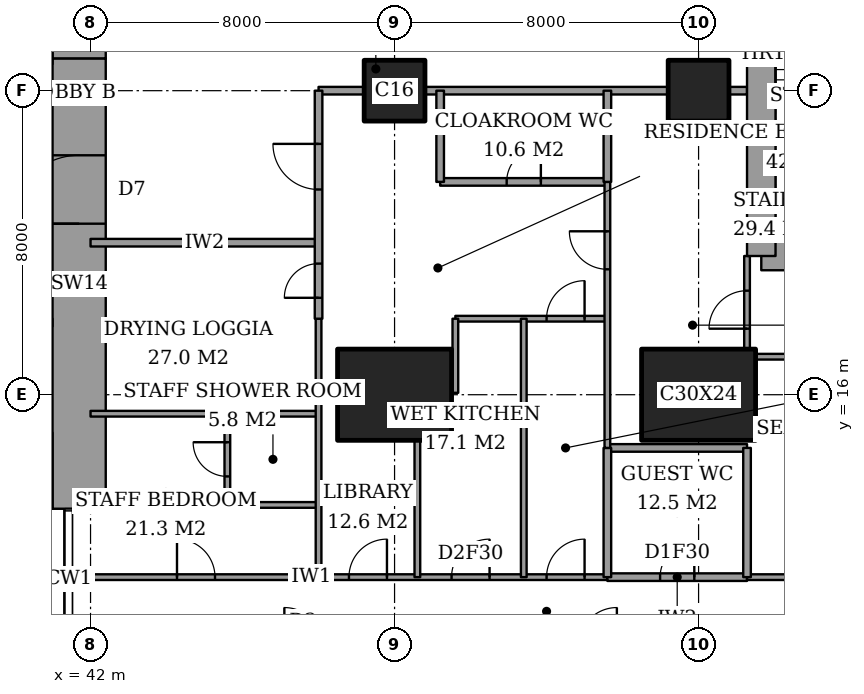
"""IFC4 building model, lengths in metres.
Left out: names, types, materials, properties, quantities, classifications, styles, units other than length and angle.
Written with IfcOpenShell. Run it as: python <this file> out.ifc"""

import sys

from ifc_helpers import new_model, si_unit, direction, frame, frame_2d, origin, origin_2d, place, context, subcontext, project, spatial, rectangle, extrude, element, fill, save


model = new_model("IFC4")
c1 = context("Model", 3, precision=1e-05, world=origin(), true_north=direction((0.0, 1.0)))
c2 = subcontext(c1, "Body", "Model", "MODEL_VIEW")
j1 = project(units=[si_unit("LENGTHUNIT", "METRE"), si_unit("PLANEANGLEUNIT", "RADIAN")], contexts=[c1])
p1 = place(None, origin())
s1 = spatial("IfcSite", under=j1, at=p1, CompositionType="ELEMENT")
p2 = place(p1, origin())
s2 = spatial("IfcBuilding", under=s1, at=p2, CompositionType="ELEMENT")
p3 = place(p2, frame((0.0, 0.0, 255.6)))
s3 = spatial("IfcBuildingStorey", under=s2, at=p3, CompositionType="ELEMENT", Elevation=255.6)
p4 = place(p3, frame((50.0, 16.0, 0.0), z_axis=(0.0, 0.0, 1.0), x_axis=(1.0, 0.0, 0.0)))
e1 = element("IfcColumn", 1, at=p4, inside=s3, PredefinedType="COLUMN", context=c2, shape_type="SweptSolid", body=[
    extrude(rectangle(XDim=3.0, YDim=2.4, at=origin_2d()), origin(), (0.0, 0.0, 1.0), 3.6),
])
p5 = place(p3, frame((50.0, 24.0, 0.0), z_axis=(0.0, 0.0, 1.0), x_axis=(1.0, 0.0, 0.0)))
e2 = element("IfcColumn", 2, at=p5, inside=s3, PredefinedType="COLUMN", context=c2, shape_type="SweptSolid", body=[
    extrude(rectangle(XDim=1.6, YDim=1.6, at=origin_2d()), origin(), (0.0, 0.0, 1.0), 3.6),
])
p6 = place(p3, frame((58.0, 16.0, 0.0), z_axis=(0.0, 0.0, 1.0), x_axis=(1.0, 0.0, 0.0)))
e3 = element("IfcColumn", 3, at=p6, inside=s3, PredefinedType="COLUMN", context=c2, shape_type="SweptSolid", body=[
    extrude(rectangle(XDim=3.0, YDim=2.4, at=origin_2d()), origin(), (0.0, 0.0, 1.0), 3.6),
])
p7 = place(p3, frame((58.0, 24.0, 0.0), z_axis=(0.0, 0.0, 1.0), x_axis=(1.0, 0.0, 0.0)))
e4 = element("IfcColumn", 4, at=p7, inside=s3, PredefinedType="COLUMN", context=c2, shape_type="SweptSolid", body=[
    extrude(rectangle(XDim=1.6, YDim=1.6, at=origin_2d()), origin(), (0.0, 0.0, 1.0), 3.6),
])
p8 = place(p3, frame((41.7, 13.0, 0.0), z_axis=(0.0, 0.0, 1.0), x_axis=(0.0, 1.0, 0.0)))
e5 = element("IfcWall", 5, at=p8, inside=s3, PredefinedType="SHEAR", context=c2, shape_type="SweptSolid", body=[
    extrude(rectangle(XDim=11.85, YDim=1.4, at=frame_2d((5.925, 0.0))), origin(), (0.0, 0.0, 1.0), 3.6),
])
p9 = place(p8, frame((7.5, 0.0, 0.0)))
e6 = element("IfcOpeningElement", 6, at=p9, cuts=e5, PredefinedType="OPENING", context=c2, shape_type="SweptSolid", body=[
    extrude(rectangle(XDim=1.8, YDim=2.4, at=frame_2d((0.9, 1.2))), frame((0.0, 0.71, 0.0), z_axis=(0.0, -1.0, 0.0), x_axis=(1.0, 0.0, 0.0)), (0.0, 0.0, 1.0), 1.42),
])
p10 = place(p3, frame((41.7, 24.85, 0.0), z_axis=(0.0, 0.0, 1.0), x_axis=(0.0, 1.0, 0.0)))
e7 = element("IfcWall", 7, at=p10, inside=s3, PredefinedType="SHEAR", context=c2, shape_type="SweptSolid", body=[
    extrude(rectangle(XDim=10.15, YDim=1.4, at=frame_2d((5.075, 0.0))), origin(), (0.0, 0.0, 1.0), 3.6),
])
p11 = place(p3, frame((59.65, 19.65, 0.0), z_axis=(0.0, 0.0, 1.0), x_axis=(1.0, 0.0, 0.0)))
e8 = element("IfcWall", 8, at=p11, inside=s3, PredefinedType="SHEAR", context=c2, shape_type="SweptSolid", body=[
    extrude(rectangle(XDim=4.45, YDim=0.75, at=frame_2d((2.225, 0.0))), origin(), (0.0, 0.0, 1.0), 3.6),
])
p12 = place(p3, frame((59.65, 28.35, 0.0), z_axis=(0.0, 0.0, 1.0), x_axis=(0.0, -1.0, 0.0)))
e9 = element("IfcWall", 9, at=p12, inside=s3, PredefinedType="SHEAR", context=c2, shape_type="SweptSolid", body=[
    extrude(rectangle(XDim=8.7, YDim=0.75, at=frame_2d((4.35, 0.0))), origin(), (0.0, 0.0, 1.0), 3.6),
])
p13 = place(p12, frame((0.975, 0.0, 0.0)))
e10 = element("IfcOpeningElement", 10, at=p13, cuts=e9, PredefinedType="OPENING", context=c2, shape_type="SweptSolid", body=[
    extrude(rectangle(XDim=1.0, YDim=2.1, at=frame_2d((0.5, 1.05))), frame((0.0, 0.385, 0.0), z_axis=(0.0, -1.0, 0.0), x_axis=(1.0, 0.0, 0.0)), (0.0, 0.0, 1.0), 0.77),
])
p14 = place(p3, frame((55.6, 11.2, 0.0), z_axis=(0.0, 0.0, 1.0), x_axis=(1.0, 0.0, 0.0)))
e11 = element("IfcWall", 11, at=p14, inside=s3, PredefinedType="PARTITIONING", context=c2, shape_type="SweptSolid", body=[
    extrude(rectangle(XDim=3.675, YDim=0.2, at=frame_2d((1.837, 0.0))), origin(), (0.0, 0.0, 1.0), 3.35),
])
p15 = place(p14, frame((1.387, 0.0, 0.0)))
e12 = element("IfcOpeningElement", 12, at=p15, cuts=e11, PredefinedType="OPENING", context=c2, shape_type="SweptSolid", body=[
    extrude(rectangle(XDim=0.9, YDim=2.1, at=frame_2d((0.45, 1.05))), frame((0.0, 0.11, 0.0), z_axis=(0.0, -1.0, 0.0), x_axis=(1.0, 0.0, 0.0)), (0.0, 0.0, 1.0), 0.22),
])
p16 = place(p3, frame((41.439, 11.2, 0.0), z_axis=(0.0, 0.0, 1.0), x_axis=(1.0, 0.0, 0.0)))
e13 = element("IfcWall", 13, at=p16, inside=s3, PredefinedType="PARTITIONING", context=c2, shape_type="SweptSolid", body=[
    extrude(rectangle(XDim=14.161, YDim=0.15, at=frame_2d((7.081, 0.0))), origin(), (0.0, 0.0, 1.0), 3.35),
])
p17 = place(p16, frame((12.561, 0.0, 0.0)))
e14 = element("IfcOpeningElement", 14, at=p17, cuts=e13, PredefinedType="OPENING", context=c2, shape_type="SweptSolid", body=[
    extrude(rectangle(XDim=1.0, YDim=2.1, at=frame_2d((0.5, 1.05))), frame((0.0, 0.085, 0.0), z_axis=(0.0, -1.0, 0.0), x_axis=(1.0, 0.0, 0.0)), (0.0, 0.0, 1.0), 0.17),
])
p18 = place(p16, frame((10.061, 0.0, 0.0)))
e15 = element("IfcOpeningElement", 15, at=p18, cuts=e13, PredefinedType="OPENING", context=c2, shape_type="SweptSolid", body=[
    extrude(rectangle(XDim=1.0, YDim=2.1, at=frame_2d((0.5, 1.05))), frame((0.0, 0.085, 0.0), z_axis=(0.0, -1.0, 0.0), x_axis=(1.0, 0.0, 0.0)), (0.0, 0.0, 1.0), 0.17),
])
p19 = place(p16, frame((7.361, 0.0, 0.0)))
e16 = element("IfcOpeningElement", 16, at=p19, cuts=e13, PredefinedType="OPENING", context=c2, shape_type="SweptSolid", body=[
    extrude(rectangle(XDim=1.0, YDim=2.1, at=frame_2d((0.5, 1.05))), frame((0.0, 0.085, 0.0), z_axis=(0.0, -1.0, 0.0), x_axis=(1.0, 0.0, 0.0)), (0.0, 0.0, 1.0), 0.17),
])
p20 = place(p16, frame((2.836, 0.0, 0.0)))
e17 = element("IfcOpeningElement", 17, at=p20, cuts=e13, PredefinedType="OPENING", context=c2, shape_type="SweptSolid", body=[
    extrude(rectangle(XDim=1.0, YDim=2.1, at=frame_2d((0.5, 1.05))), frame((0.0, 0.085, 0.0), z_axis=(0.0, -1.0, 0.0), x_axis=(1.0, 0.0, 0.0)), (0.0, 0.0, 1.0), 0.17),
])
p21 = place(p3, frame((59.275, 11.2, 0.0), z_axis=(0.0, 0.0, 1.0), x_axis=(1.0, 0.0, 0.0)))
e18 = element("IfcWall", 18, at=p21, inside=s3, PredefinedType="PARTITIONING", context=c2, shape_type="SweptSolid", body=[
    extrude(rectangle(XDim=7.175, YDim=0.15, at=frame_2d((3.587, 0.0))), origin(), (0.0, 0.0, 1.0), 3.35),
])
p22 = place(p21, frame((3.087, 0.0, 0.0)))
e19 = element("IfcOpeningElement", 19, at=p22, cuts=e18, PredefinedType="OPENING", context=c2, shape_type="SweptSolid", body=[
    extrude(rectangle(XDim=1.0, YDim=2.1, at=frame_2d((0.5, 1.05))), frame((0.0, 0.085, 0.0), z_axis=(0.0, -1.0, 0.0), x_axis=(1.0, 0.0, 0.0)), (0.0, 0.0, 1.0), 0.17),
])
p23 = place(p3, frame((45.6, 13.1, 0.0), z_axis=(0.0, 0.0, 1.0), x_axis=(1.0, 0.0, 0.0)))
e20 = element("IfcWall", 20, at=p23, inside=s3, PredefinedType="PARTITIONING", context=c2, shape_type="SweptSolid", body=[
    extrude(rectangle(XDim=2.4, YDim=0.15, at=frame_2d((1.2, 0.0))), origin(), (0.0, 0.0, 1.0), 3.35),
])
p24 = place(p3, frame((55.6, 14.6, 0.0), z_axis=(0.0, 0.0, 1.0), x_axis=(1.0, 0.0, 0.0)))
e21 = element("IfcWall", 21, at=p24, inside=s3, PredefinedType="PARTITIONING", context=c2, shape_type="SweptSolid", body=[
    extrude(rectangle(XDim=3.675, YDim=0.2, at=frame_2d((1.837, 0.0))), origin(), (0.0, 0.0, 1.0), 3.35),
])
p25 = place(p3, frame((42.0, 15.5, 0.0), z_axis=(0.0, 0.0, 1.0), x_axis=(1.0, 0.0, 0.0)))
e22 = element("IfcWall", 22, at=p25, inside=s3, PredefinedType="PARTITIONING", context=c2, shape_type="SweptSolid", body=[
    extrude(rectangle(XDim=6.0, YDim=0.15, at=frame_2d((3.0, 0.0))), origin(), (0.0, 0.0, 1.0), 3.35),
])
p26 = place(p3, frame((48.0, 16.05, 0.0), z_axis=(0.0, 0.0, 1.0), x_axis=(1.0, 0.0, 0.0)))
e23 = element("IfcWall", 23, at=p26, inside=s3, PredefinedType="PARTITIONING", context=c2, shape_type="SweptSolid", body=[
    extrude(rectangle(XDim=0.5, YDim=0.15, at=frame_2d((0.25, 0.0))), origin(), (0.0, 0.0, 1.0), 2.634),
])
p27 = place(p3, frame((59.5, 17.0, 0.0), z_axis=(0.0, 0.0, 1.0), x_axis=(1.0, 0.0, 0.0)))
e24 = element("IfcWall", 24, at=p27, inside=s3, PredefinedType="PARTITIONING", context=c2, shape_type="SweptSolid", body=[
    extrude(rectangle(XDim=6.95, YDim=0.15, at=frame_2d((3.475, 0.0))), origin(), (0.0, 0.0, 1.0), 3.35),
])
p28 = place(p3, frame((51.6, 18.0, 0.0), z_axis=(0.0, 0.0, 1.0), x_axis=(1.0, 0.0, 0.0)))
e25 = element("IfcWall", 25, at=p28, inside=s3, PredefinedType="PARTITIONING", context=c2, shape_type="SweptSolid", body=[
    extrude(rectangle(XDim=4.0, YDim=0.15, at=frame_2d((2.0, 0.0))), origin(), (0.0, 0.0, 1.0), 3.35),
])
p29 = place(p28, frame((2.4, 0.0, 0.0)))
e26 = element("IfcOpeningElement", 26, at=p29, cuts=e25, PredefinedType="OPENING", context=c2, shape_type="SweptSolid", body=[
    extrude(rectangle(XDim=1.0, YDim=2.1, at=frame_2d((0.5, 1.05))), frame((0.0, 0.085, 0.0), z_axis=(0.0, -1.0, 0.0), x_axis=(1.0, 0.0, 0.0)), (0.0, 0.0, 1.0), 0.17),
])
p30 = place(p3, frame((42.0, 20.0, 0.0), z_axis=(0.0, 0.0, 1.0), x_axis=(1.0, 0.0, 0.0)))
e27 = element("IfcWall", 27, at=p30, inside=s3, PredefinedType="PARTITIONING", context=c2, shape_type="SweptSolid", body=[
    extrude(rectangle(XDim=6.0, YDim=0.2, at=frame_2d((3.0, 0.0))), origin(), (0.0, 0.0, 1.0), 3.35),
])
p31 = place(p3, frame((51.2, 21.6, 0.0), z_axis=(0.0, 0.0, 1.0), x_axis=(1.0, 0.0, 0.0)))
e28 = element("IfcWall", 28, at=p31, inside=s3, PredefinedType="PARTITIONING", context=c2, shape_type="SweptSolid", body=[
    extrude(rectangle(XDim=4.4, YDim=0.2, at=frame_2d((2.2, 0.0))), origin(), (0.0, 0.0, 1.0), 3.35),
])
p32 = place(p31, frame((1.75, 0.0, 0.0)))
e29 = element("IfcOpeningElement", 29, at=p32, cuts=e28, PredefinedType="OPENING", context=c2, shape_type="SweptSolid", body=[
    extrude(rectangle(XDim=0.9, YDim=2.1, at=frame_2d((0.45, 1.05))), frame((0.0, 0.11, 0.0), z_axis=(0.0, -1.0, 0.0), x_axis=(1.0, 0.0, 0.0)), (0.0, 0.0, 1.0), 0.22),
])
p33 = place(p3, frame((48.0, 24.0, 0.0), z_axis=(0.0, 0.0, 1.0), x_axis=(1.0, 0.0, 0.0)))
e30 = element("IfcWall", 30, at=p33, inside=s3, PredefinedType="PARTITIONING", context=c2, shape_type="SweptSolid", body=[
    extrude(rectangle(XDim=1.2, YDim=0.2, at=frame_2d((0.6, 0.0))), origin(), (0.0, 0.0, 1.0), 3.35),
])
p34 = place(p3, frame((50.8, 24.0, 0.0), z_axis=(0.0, 0.0, 1.0), x_axis=(1.0, 0.0, 0.0)))
e31 = element("IfcWall", 31, at=p34, inside=s3, PredefinedType="PARTITIONING", context=c2, shape_type="SweptSolid", body=[
    extrude(rectangle(XDim=6.4, YDim=0.2, at=frame_2d((3.2, 0.0))), origin(), (0.0, 0.0, 1.0), 3.35),
])
p35 = place(p3, frame((58.8, 24.0, 0.0), z_axis=(0.0, 0.0, 1.0), x_axis=(1.0, 0.0, 0.0)))
e32 = element("IfcWall", 32, at=p35, inside=s3, PredefinedType="PARTITIONING", context=c2, shape_type="SweptSolid", body=[
    extrude(rectangle(XDim=0.475, YDim=0.2, at=frame_2d((0.237, 0.0))), origin(), (0.0, 0.0, 1.0), 3.35),
])
p36 = place(p3, frame((45.6, 13.1, 0.0), z_axis=(0.0, 0.0, 1.0), x_axis=(0.0, 1.0, 0.0)))
e33 = element("IfcWall", 33, at=p36, inside=s3, PredefinedType="PARTITIONING", context=c2, shape_type="SweptSolid", body=[
    extrude(rectangle(XDim=2.4, YDim=0.15, at=frame_2d((1.2, 0.0))), origin(), (0.0, 0.0, 1.0), 3.35),
])
p37 = place(p36, frame((0.75, 0.0, 0.0)))
e34 = element("IfcOpeningElement", 34, at=p37, cuts=e33, PredefinedType="OPENING", context=c2, shape_type="SweptSolid", body=[
    extrude(rectangle(XDim=0.9, YDim=2.1, at=frame_2d((0.45, 1.05))), frame((0.0, 0.085, 0.0), z_axis=(0.0, -1.0, 0.0), x_axis=(1.0, 0.0, 0.0)), (0.0, 0.0, 1.0), 0.17),
])
p38 = place(p3, frame((48.0, 18.0, 0.0), z_axis=(0.0, 0.0, 1.0), x_axis=(0.0, 1.0, 0.0)))
e35 = element("IfcWall", 35, at=p38, inside=s3, PredefinedType="PARTITIONING", context=c2, shape_type="SweptSolid", body=[
    extrude(rectangle(XDim=6.0, YDim=0.2, at=frame_2d((3.0, 0.0))), origin(), (0.0, 0.0, 1.0), 3.35),
])
p39 = place(p38, frame((3.4, 0.0, 0.0)))
e36 = element("IfcOpeningElement", 36, at=p39, cuts=e35, PredefinedType="OPENING", context=c2, shape_type="SweptSolid", body=[
    extrude(rectangle(XDim=1.2, YDim=2.4, at=frame_2d((0.6, 1.2))), frame((0.0, 0.11, 0.0), z_axis=(0.0, -1.0, 0.0), x_axis=(1.0, 0.0, 0.0)), (0.0, 0.0, 1.0), 0.22),
])
p40 = place(p38, frame((0.55, 0.0, 0.0)))
e37 = element("IfcOpeningElement", 37, at=p40, cuts=e35, PredefinedType="OPENING", context=c2, shape_type="SweptSolid", body=[
    extrude(rectangle(XDim=0.9, YDim=2.1, at=frame_2d((0.45, 1.05))), frame((0.0, 0.11, 0.0), z_axis=(0.0, -1.0, 0.0), x_axis=(1.0, 0.0, 0.0)), (0.0, 0.0, 1.0), 0.22),
])
p41 = place(p3, frame((48.0, 11.2, 0.0), z_axis=(0.0, 0.0, 1.0), x_axis=(0.0, 1.0, 0.0)))
e38 = element("IfcWall", 38, at=p41, inside=s3, PredefinedType="PARTITIONING", context=c2, shape_type="SweptSolid", body=[
    extrude(rectangle(XDim=6.8, YDim=0.15, at=frame_2d((3.4, 0.0))), origin(), (0.0, 0.0, 1.0), 3.35),
])
p42 = place(p3, frame((50.6, 11.2, 0.0), z_axis=(0.0, 0.0, 1.0), x_axis=(0.0, 1.0, 0.0)))
e39 = element("IfcWall", 39, at=p42, inside=s3, PredefinedType="PARTITIONING", context=c2, shape_type="SweptSolid", body=[
    extrude(rectangle(XDim=3.6, YDim=0.15, at=frame_2d((1.8, 0.0))), origin(), (0.0, 0.0, 1.0), 3.35),
])
p43 = place(p3, frame((51.2, 21.6, 0.0), z_axis=(0.0, 0.0, 1.0), x_axis=(0.0, 1.0, 0.0)))
e40 = element("IfcWall", 40, at=p43, inside=s3, PredefinedType="PARTITIONING", context=c2, shape_type="SweptSolid", body=[
    extrude(rectangle(XDim=2.4, YDim=0.2, at=frame_2d((1.2, 0.0))), origin(), (0.0, 0.0, 1.0), 3.35),
])
p44 = place(p3, frame((51.6, 16.05, 0.0), z_axis=(0.0, 0.0, 1.0), x_axis=(0.0, 1.0, 0.0)))
e41 = element("IfcWall", 41, at=p44, inside=s3, PredefinedType="PARTITIONING", context=c2, shape_type="SweptSolid", body=[
    extrude(rectangle(XDim=1.95, YDim=0.15, at=frame_2d((0.975, 0.0))), origin(), (0.0, 0.0, 1.0), 3.35),
])
p45 = place(p3, frame((53.4, 11.2, 0.0), z_axis=(0.0, 0.0, 1.0), x_axis=(0.0, 1.0, 0.0)))
e42 = element("IfcWall", 42, at=p45, inside=s3, PredefinedType="PARTITIONING", context=c2, shape_type="SweptSolid", body=[
    extrude(rectangle(XDim=6.8, YDim=0.15, at=frame_2d((3.4, 0.0))), origin(), (0.0, 0.0, 1.0), 3.35),
])
p46 = place(p3, frame((55.6, 11.2, 0.0), z_axis=(0.0, 0.0, 1.0), x_axis=(0.0, 1.0, 0.0)))
e43 = element("IfcWall", 43, at=p46, inside=s3, PredefinedType="PARTITIONING", context=c2, shape_type="SweptSolid", body=[
    extrude(rectangle(XDim=3.4, YDim=0.2, at=frame_2d((1.7, 0.0))), origin(), (0.0, 0.0, 1.0), 3.35),
])
p47 = place(p3, frame((55.6, 21.6, 0.0), z_axis=(0.0, 0.0, 1.0), x_axis=(0.0, 1.0, 0.0)))
e44 = element("IfcWall", 44, at=p47, inside=s3, PredefinedType="PARTITIONING", context=c2, shape_type="SweptSolid", body=[
    extrude(rectangle(XDim=2.4, YDim=0.2, at=frame_2d((1.2, 0.0))), origin(), (0.0, 0.0, 1.0), 3.35),
])
p48 = place(p3, frame((55.6, 14.6, 0.0), z_axis=(0.0, 0.0, 1.0), x_axis=(0.0, 1.0, 0.0)))
e45 = element("IfcWall", 45, at=p48, inside=s3, PredefinedType="PARTITIONING", context=c2, shape_type="SweptSolid", body=[
    extrude(rectangle(XDim=7.0, YDim=0.15, at=frame_2d((3.5, 0.0))), origin(), (0.0, 0.0, 1.0), 3.35),
])
p49 = place(p48, frame((4.7, 0.0, 0.0)))
e46 = element("IfcOpeningElement", 46, at=p49, cuts=e45, PredefinedType="OPENING", context=c2, shape_type="SweptSolid", body=[
    extrude(rectangle(XDim=1.0, YDim=2.1, at=frame_2d((0.5, 1.05))), frame((0.0, 0.085, 0.0), z_axis=(0.0, -1.0, 0.0), x_axis=(1.0, 0.0, 0.0)), (0.0, 0.0, 1.0), 0.17),
])
p50 = place(p3, frame((59.275, 11.2, 0.0), z_axis=(0.0, 0.0, 1.0), x_axis=(0.0, 1.0, 0.0)))
e47 = element("IfcWall", 47, at=p50, inside=s3, PredefinedType="PARTITIONING", context=c2, shape_type="SweptSolid", body=[
    extrude(rectangle(XDim=3.4, YDim=0.2, at=frame_2d((1.7, 0.0))), origin(), (0.0, 0.0, 1.0), 3.35),
])
p51 = place(p3, frame((59.275, 17.2, 0.0), z_axis=(0.0, 0.0, 1.0), x_axis=(0.0, 1.0, 0.0)))
e48 = element("IfcWall", 48, at=p51, inside=s3, PredefinedType="PARTITIONING", context=c2, shape_type="SweptSolid", body=[
    extrude(rectangle(XDim=2.45, YDim=0.15, at=frame_2d((1.225, 0.0))), origin(), (0.0, 0.0, 1.0), 3.35),
])
p52 = place(p51, frame((0.538, 0.0, 0.0)))
e49 = element("IfcOpeningElement", 49, at=p52, cuts=e48, PredefinedType="OPENING", context=c2, shape_type="SweptSolid", body=[
    extrude(rectangle(XDim=1.0, YDim=2.1, at=frame_2d((0.5, 1.05))), frame((0.0, 0.085, 0.0), z_axis=(0.0, -1.0, 0.0), x_axis=(1.0, 0.0, 0.0)), (0.0, 0.0, 1.0), 0.17),
])
p53 = place(p3, frame((28.3, 17.9, 0.0), z_axis=(0.0, 0.0, 1.0), x_axis=(1.0, 0.0, 0.0)))
e50 = element("IfcWall", 50, at=p53, inside=s3, PredefinedType="PARTITIONING", context=c2, shape_type="SweptSolid", body=[
    extrude(rectangle(XDim=12.7, YDim=0.2, at=frame_2d((6.35, 0.0))), origin(), (0.0, 0.0, 1.0), 3.6),
])
p54 = place(p53, frame((1.0, 0.0, 0.0)))
e51 = element("IfcOpeningElement", 51, at=p54, cuts=e50, PredefinedType="OPENING", context=c2, shape_type="SweptSolid", body=[
    extrude(rectangle(XDim=1.0, YDim=2.1, at=frame_2d((0.5, 1.05))), frame((0.0, 0.11, 0.0), z_axis=(0.0, -1.0, 0.0), x_axis=(1.0, 0.0, 0.0)), (0.0, 0.0, 1.0), 0.22),
])
p55 = place(p53, frame((10.6, 0.0, 0.0)))
e52 = element("IfcOpeningElement", 52, at=p55, cuts=e50, PredefinedType="OPENING", context=c2, shape_type="SweptSolid", body=[
    extrude(rectangle(XDim=1.2, YDim=2.1, at=frame_2d((0.6, 1.05))), frame((0.0, 0.11, 0.0), z_axis=(0.0, -1.0, 0.0), x_axis=(1.0, 0.0, 0.0)), (0.0, 0.0, 1.0), 0.22),
])
p56 = place(p17, origin())
e53 = element("IfcDoor", 53, at=p56, inside=s3, OperationType="SINGLE_SWING_LEFT", PredefinedType="DOOR", context=c2, shape_type="SweptSolid", body=[
    extrude(rectangle(XDim=1.0, YDim=2.1, at=frame_2d((0.5, 1.05))), frame((0.0, 0.025, 0.0), z_axis=(0.0, -1.0, 0.0), x_axis=(1.0, 0.0, 0.0)), (0.0, 0.0, 1.0), 0.05),
])
fill(e14, e53)
p57 = place(p52, origin())
e54 = element("IfcDoor", 54, at=p57, inside=s3, OperationType="SINGLE_SWING_RIGHT", PredefinedType="DOOR", context=c2, shape_type="SweptSolid", body=[
    extrude(rectangle(XDim=1.0, YDim=2.1, at=frame_2d((0.5, 1.05))), frame((0.0, 0.025, 0.0), z_axis=(0.0, -1.0, 0.0), x_axis=(1.0, 0.0, 0.0)), (0.0, 0.0, 1.0), 0.05),
])
fill(e49, e54)
p58 = place(p15, origin())
e55 = element("IfcDoor", 55, at=p58, inside=s3, OperationType="SINGLE_SWING_LEFT", PredefinedType="DOOR", context=c2, shape_type="SweptSolid", body=[
    extrude(rectangle(XDim=0.9, YDim=2.1, at=frame_2d((0.45, 1.05))), frame((0.0, 0.025, 0.0), z_axis=(0.0, -1.0, 0.0), x_axis=(1.0, 0.0, 0.0)), (0.0, 0.0, 1.0), 0.05),
])
fill(e12, e55)
p59 = place(p49, origin())
e56 = element("IfcDoor", 56, at=p59, inside=s3, OperationType="SINGLE_SWING_LEFT", PredefinedType="DOOR", context=c2, shape_type="SweptSolid", body=[
    extrude(rectangle(XDim=1.0, YDim=2.1, at=frame_2d((0.5, 1.05))), frame((0.0, 0.025, 0.0), z_axis=(0.0, -1.0, 0.0), x_axis=(1.0, 0.0, 0.0)), (0.0, 0.0, 1.0), 0.05),
])
fill(e46, e56)
p60 = place(p32, origin())
e57 = element("IfcDoor", 57, at=p60, inside=s3, OperationType="SINGLE_SWING_LEFT", PredefinedType="DOOR", context=c2, shape_type="SweptSolid", body=[
    extrude(rectangle(XDim=0.9, YDim=2.1, at=frame_2d((0.45, 1.05))), frame((0.0, 0.025, 0.0), z_axis=(0.0, -1.0, 0.0), x_axis=(1.0, 0.0, 0.0)), (0.0, 0.0, 1.0), 0.05),
])
fill(e29, e57)
p61 = place(p39, origin())
e58 = element("IfcDoor", 58, at=p61, inside=s3, OperationType="SINGLE_SWING_LEFT", PredefinedType="DOOR", context=c2, shape_type="SweptSolid", body=[
    extrude(rectangle(XDim=1.2, YDim=2.4, at=frame_2d((0.6, 1.2))), frame((0.0, 0.025, 0.0), z_axis=(0.0, -1.0, 0.0), x_axis=(1.0, 0.0, 0.0)), (0.0, 0.0, 1.0), 0.05),
])
fill(e36, e58)
p62 = place(p29, origin())
e59 = element("IfcDoor", 59, at=p62, inside=s3, OperationType="SINGLE_SWING_LEFT", PredefinedType="DOOR", context=c2, shape_type="SweptSolid", body=[
    extrude(rectangle(XDim=1.0, YDim=2.1, at=frame_2d((0.5, 1.05))), frame((0.0, 0.025, 0.0), z_axis=(0.0, -1.0, 0.0), x_axis=(1.0, 0.0, 0.0)), (0.0, 0.0, 1.0), 0.05),
])
fill(e26, e59)
p63 = place(p18, origin())
e60 = element("IfcDoor", 60, at=p63, inside=s3, OperationType="SINGLE_SWING_LEFT", PredefinedType="DOOR", context=c2, shape_type="SweptSolid", body=[
    extrude(rectangle(XDim=1.0, YDim=2.1, at=frame_2d((0.5, 1.05))), frame((0.0, 0.025, 0.0), z_axis=(0.0, -1.0, 0.0), x_axis=(1.0, 0.0, 0.0)), (0.0, 0.0, 1.0), 0.05),
])
fill(e15, e60)
p64 = place(p19, origin())
e61 = element("IfcDoor", 61, at=p64, inside=s3, OperationType="SINGLE_SWING_LEFT", PredefinedType="DOOR", context=c2, shape_type="SweptSolid", body=[
    extrude(rectangle(XDim=1.0, YDim=2.1, at=frame_2d((0.5, 1.05))), frame((0.0, 0.025, 0.0), z_axis=(0.0, -1.0, 0.0), x_axis=(1.0, 0.0, 0.0)), (0.0, 0.0, 1.0), 0.05),
])
fill(e16, e61)
p65 = place(p37, origin())
e62 = element("IfcDoor", 62, at=p65, inside=s3, OperationType="SINGLE_SWING_LEFT", PredefinedType="DOOR", context=c2, shape_type="SweptSolid", body=[
    extrude(rectangle(XDim=0.9, YDim=2.1, at=frame_2d((0.45, 1.05))), frame((0.0, 0.025, 0.0), z_axis=(0.0, -1.0, 0.0), x_axis=(1.0, 0.0, 0.0)), (0.0, 0.0, 1.0), 0.05),
])
fill(e34, e62)
p66 = place(p20, origin())
e63 = element("IfcDoor", 63, at=p66, inside=s3, OperationType="SINGLE_SWING_RIGHT", PredefinedType="DOOR", context=c2, shape_type="SweptSolid", body=[
    extrude(rectangle(XDim=1.0, YDim=2.1, at=frame_2d((0.5, 1.05))), frame((0.0, 0.025, 0.0), z_axis=(0.0, -1.0, 0.0), x_axis=(1.0, 0.0, 0.0)), (0.0, 0.0, 1.0), 0.05),
])
fill(e17, e63)
p67 = place(p40, origin())
e64 = element("IfcDoor", 64, at=p67, inside=s3, OperationType="SINGLE_SWING_RIGHT", PredefinedType="DOOR", context=c2, shape_type="SweptSolid", body=[
    extrude(rectangle(XDim=0.9, YDim=2.1, at=frame_2d((0.45, 1.05))), frame((0.0, 0.025, 0.0), z_axis=(0.0, -1.0, 0.0), x_axis=(1.0, 0.0, 0.0)), (0.0, 0.0, 1.0), 0.05),
])
fill(e37, e64)
p68 = place(p9, origin())
e65 = element("IfcDoor", 65, at=p68, inside=s3, OperationType="DOUBLE_DOOR_DOUBLE_SWING", PredefinedType="DOOR", context=c2, shape_type="SweptSolid", body=[
    extrude(rectangle(XDim=1.8, YDim=2.4, at=frame_2d((0.9, 1.2))), frame((0.0, 0.025, 0.0), z_axis=(0.0, -1.0, 0.0), x_axis=(1.0, 0.0, 0.0)), (0.0, 0.0, 1.0), 0.05),
])
fill(e6, e65)
save(model, sys.argv[1])
